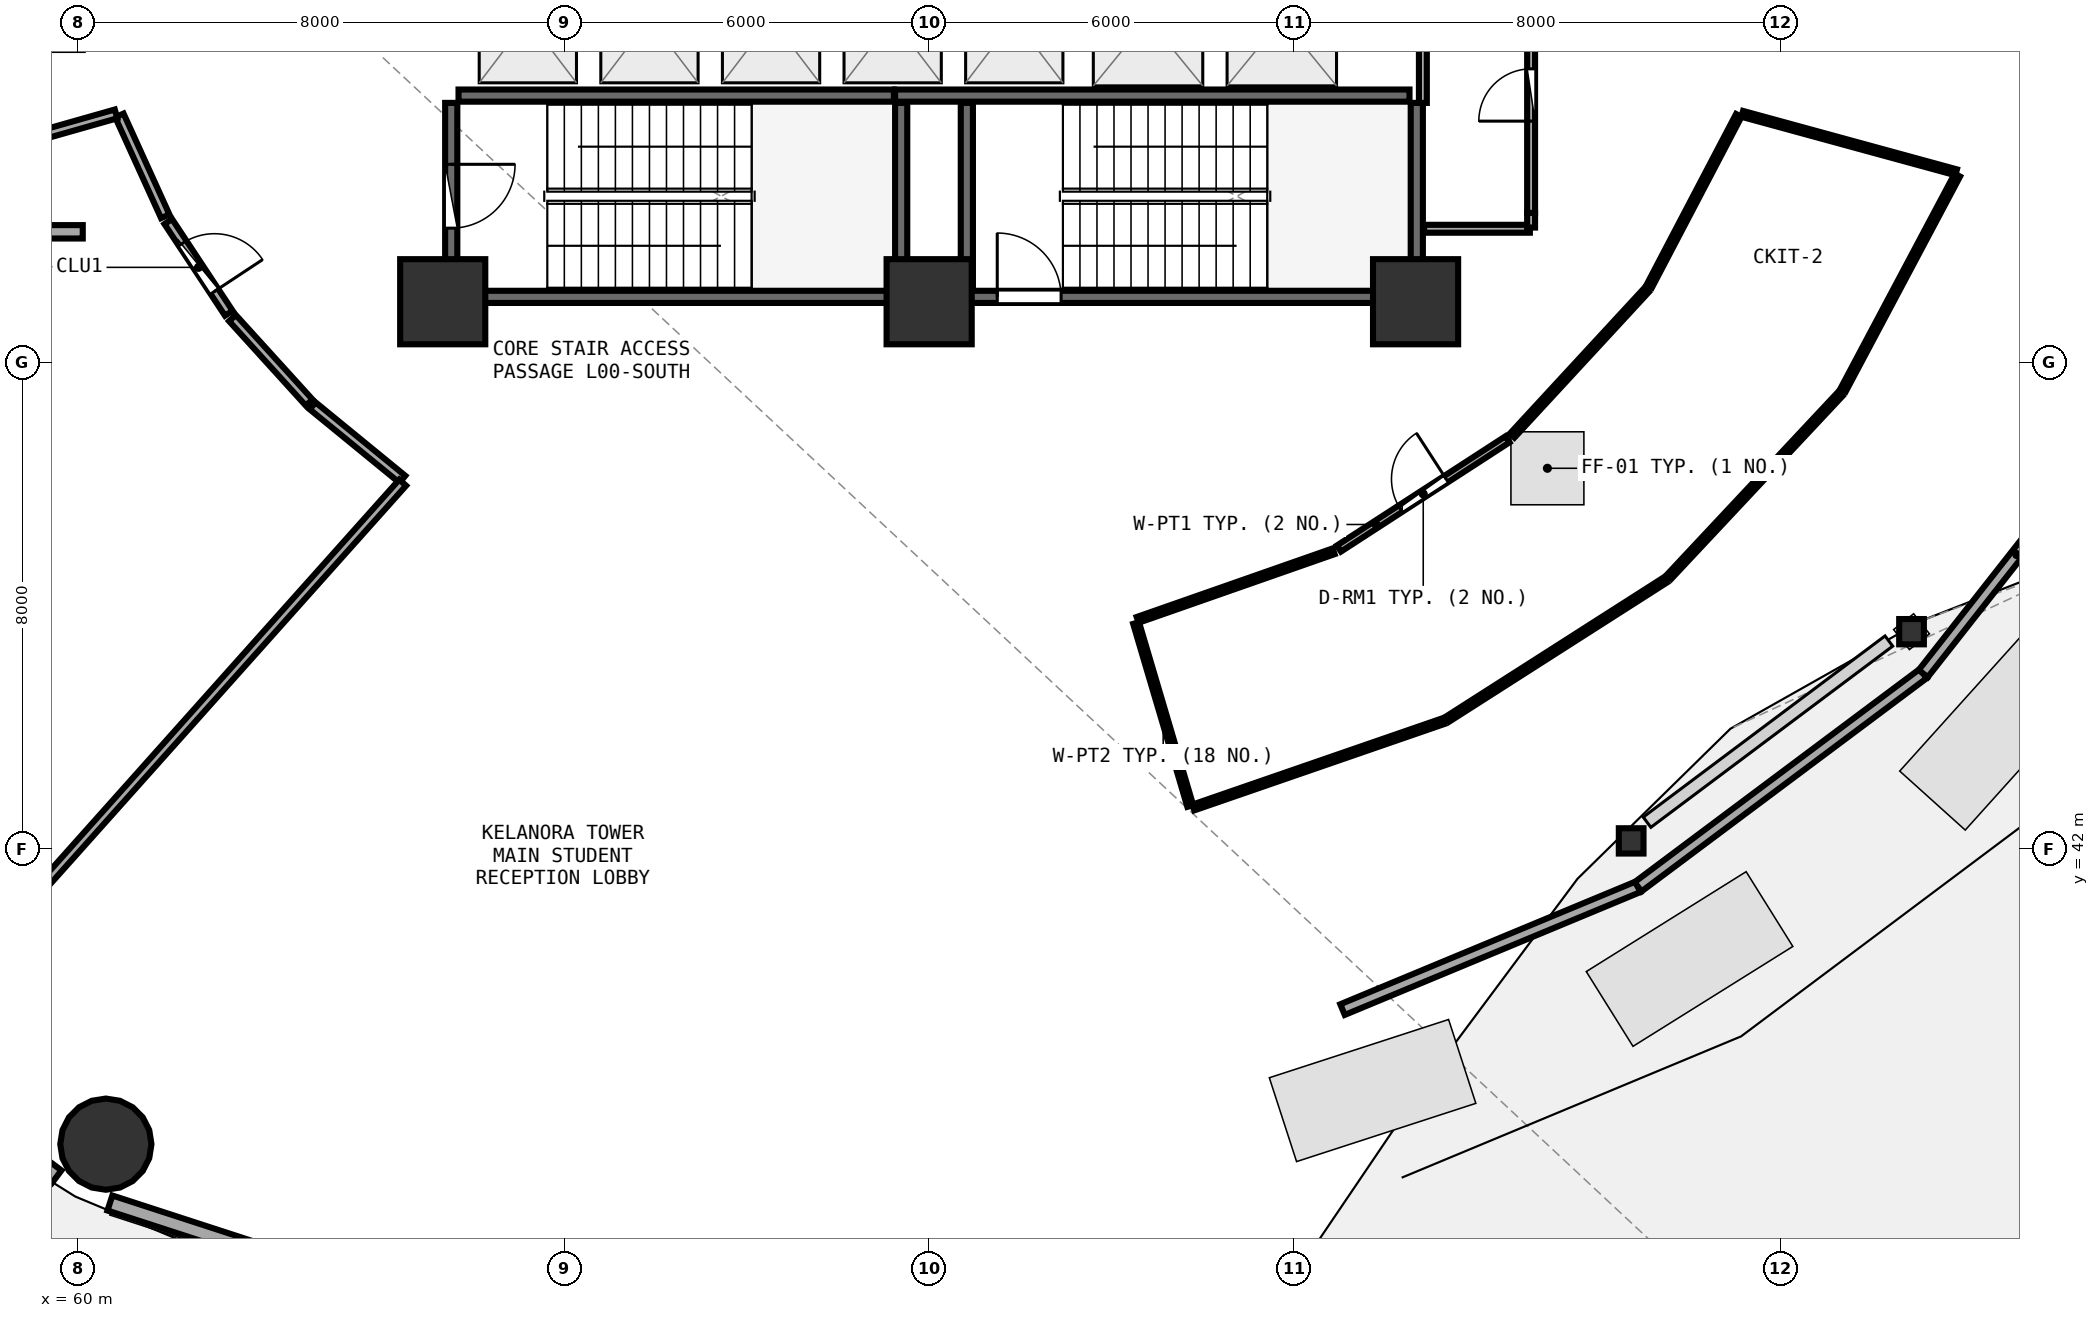
"""IFC4 building model, lengths in metres.
Left out: names, types, materials, properties, quantities, classifications, styles, units other than length and angle.
Written with IfcOpenShell. Run it as: python <this file> out.ifc"""

import sys

from ifc_helpers import new_model, si_unit, direction, frame, frame_2d, origin, origin_2d, place, context, subcontext, project, spatial, rectangle, circle, i_section, extrude, element, fill, save


model = new_model("IFC4")
c1 = context("Model", 3, precision=1e-05, world=origin(), true_north=direction((0.0, 1.0)))
c2 = subcontext(c1, "Body", "Model", "MODEL_VIEW")
j1 = project(units=[si_unit("LENGTHUNIT", "METRE"), si_unit("PLANEANGLEUNIT", "RADIAN")], contexts=[c1])
p1 = place(None, origin())
s1 = spatial("IfcSite", under=j1, at=p1, CompositionType="ELEMENT")
p2 = place(p1, origin())
s2 = spatial("IfcBuilding", under=s1, at=p2, CompositionType="ELEMENT")
p3 = place(p2, origin())
s3 = spatial("IfcBuildingStorey", under=s2, at=p3, CompositionType="ELEMENT", Elevation=0.0)
for number, where, z_axis, x_axis in (
    (1, (66.0, 51.0, 0.0), (0.0, 0.0, 1.0), (1.0, 0.0, 0.0)),
    (2, (74.0, 51.0, 0.0), (0.0, 0.0, 1.0), (1.0, 0.0, 0.0)),
    (3, (82.0, 51.0, 0.0), (0.0, 0.0, 1.0), (1.0, 0.0, 0.0)),
):
    element("IfcColumn", number, at=place(p3, frame(where, z_axis=z_axis, x_axis=x_axis)), inside=s3, PredefinedType="PILASTER", context=c2, shape_type="SweptSolid", body=[
        extrude(rectangle(XDim=1.4, YDim=1.4, at=origin_2d()), origin(), (0.0, 0.0, 1.0), 4.5),
    ])
p4 = place(p3, frame((60.46, 37.146, 0.0), z_axis=(0.0, 0.0, 1.0), x_axis=(1.0, 0.0, 0.0)))
e4 = element("IfcColumn", 4, at=p4, inside=s3, PredefinedType="COLUMN", context=c2, shape_type="SweptSolid", body=[
    extrude(circle(Radius=0.75, at=origin_2d()), origin(), (0.0, 0.0, 1.0), 4.5),
])
for number, where, z_axis, x_axis in (
    (5, (85.546, 42.134, 0.0), (0.0, 0.0, 1.0), (1.0, 0.0, 0.0)),
    (6, (90.156, 45.574, 0.0), (0.0, 0.0, 1.0), (1.0, 0.0, 0.0)),
):
    element("IfcColumn", number, at=place(p3, frame(where, z_axis=z_axis, x_axis=x_axis)), inside=s3, PredefinedType="COLUMN", context=c2, shape_type="SweptSolid", body=[
        extrude(i_section(OverallWidth=0.406, OverallDepth=0.416, WebThickness=0.029, FlangeThickness=0.048, FilletRadius=0.015, at=origin_2d()), origin(), (0.0, 0.0, 1.0), 4.5),
    ])
p5 = place(p3, frame((53.016, 41.582, 0.0), z_axis=(0.0, 0.0, 1.0), x_axis=(0.80030733173, -0.599590005569, 0.0)))
e7 = element("IfcWall", 7, at=p5, inside=s3, PredefinedType="SOLIDWALL", context=c2, shape_type="SweptSolid", body=[
    extrude(rectangle(XDim=8.291, YDim=0.26, at=frame_2d((4.145, 0.0))), origin(), (0.0, 0.0, 1.0), 4.185),
])
p6 = place(p5, frame((2.945, 0.0, 0.0)))
e8 = element("IfcOpeningElement", 8, at=p6, cuts=e7, PredefinedType="OPENING", context=c2, shape_type="SweptSolid", body=[
    extrude(rectangle(XDim=2.4, YDim=2.35, at=frame_2d((1.2, 1.175))), frame((0.0, 0.14, 0.0), z_axis=(0.0, -1.0, 0.0), x_axis=(1.0, 0.0, 0.0)), (0.0, 0.0, 1.0), 0.28),
])
p7 = place(p3, frame((60.526, 36.178, 0.0), z_axis=(0.0, 0.0, 1.0), x_axis=(0.951039914291, -0.309068085421, 0.0)))
e9 = element("IfcWall", 9, at=p7, inside=s3, PredefinedType="SOLIDWALL", context=c2, shape_type="SweptSolid", body=[
    extrude(rectangle(XDim=8.594, YDim=0.26, at=frame_2d((4.297, 0.0))), origin(), (0.0, 0.0, 1.0), 4.185),
])
p8 = place(p7, frame((3.097, 0.0, 0.0)))
e10 = element("IfcOpeningElement", 10, at=p8, cuts=e9, PredefinedType="OPENING", context=c2, shape_type="SweptSolid", body=[
    extrude(rectangle(XDim=2.4, YDim=2.35, at=frame_2d((1.2, 1.175))), frame((0.0, 0.14, 0.0), z_axis=(0.0, -1.0, 0.0), x_axis=(1.0, 0.0, 0.0)), (0.0, 0.0, 1.0), 0.28),
])
p9 = place(p3, frame((80.798, 39.359, 0.0), z_axis=(0.0, 0.0, 1.0), x_axis=(0.923474464617, 0.383659892614, 0.0)))
e11 = element("IfcWall", 11, at=p9, inside=s3, PredefinedType="PARAPET", context=c2, shape_type="SweptSolid", body=[
    extrude(rectangle(XDim=5.263, YDim=0.19, at=frame_2d((2.631, 0.0))), origin(), (0.0, 0.0, 1.0), 0.62),
])
p10 = place(p3, frame((85.658, 41.378, 0.0), z_axis=(0.0, 0.0, 1.0), x_axis=(0.800949430728, 0.59873200133, 0.0)))
e12 = element("IfcWall", 12, at=p10, inside=s3, PredefinedType="PARAPET", context=c2, shape_type="SweptSolid", body=[
    extrude(rectangle(XDim=5.857, YDim=0.19, at=frame_2d((2.928, 0.0))), origin(), (0.0, 0.0, 1.0), 0.62),
])
p11 = place(p3, frame((90.349, 44.885, 0.0), z_axis=(0.0, 0.0, 1.0), x_axis=(0.617936357215, 0.786228121115, 0.0)))
e13 = element("IfcWall", 13, at=p11, inside=s3, PredefinedType="PARAPET", context=c2, shape_type="SweptSolid", body=[
    extrude(rectangle(XDim=4.977, YDim=0.19, at=frame_2d((2.489, 0.0))), origin(), (0.0, 0.0, 1.0), 0.62),
])
p12 = place(p3, frame((74.0, 51.08, 0.0), z_axis=(0.0, 0.0, 1.0), x_axis=(1.0, 0.0, 0.0)))
e14 = element("IfcWall", 14, at=p12, inside=s3, PredefinedType="SHEAR", context=c2, shape_type="SweptSolid", body=[
    extrude(rectangle(XDim=7.9, YDim=0.2, at=frame_2d((3.95, 0.0))), origin(), (0.0, 0.0, 1.0), 4.2),
])
p13 = place(p12, frame((1.12, 0.0, 0.0)))
e15 = element("IfcOpeningElement", 15, at=p13, cuts=e14, PredefinedType="OPENING", context=c2, shape_type="SweptSolid", body=[
    extrude(rectangle(XDim=1.05, YDim=2.1, at=frame_2d((0.525, 1.05))), frame((0.0, 0.11, 0.0), z_axis=(0.0, -1.0, 0.0), x_axis=(1.0, 0.0, 0.0)), (0.0, 0.0, 1.0), 0.22),
])
p14 = place(p3, frame((82.02, 51.2, 0.0), z_axis=(0.0, 0.0, 1.0), x_axis=(0.0, 1.0, 0.0)))
e16 = element("IfcWall", 16, at=p14, inside=s3, PredefinedType="SHEAR", context=c2, shape_type="SweptSolid", body=[
    extrude(rectangle(XDim=3.07, YDim=0.2, at=frame_2d((1.535, 0.0))), origin(), (0.0, 0.0, 1.0), 4.2),
])
p15 = place(p3, frame((81.9, 54.39, 0.0), z_axis=(0.0, 0.0, 1.0), x_axis=(-1.0, 0.0, 0.0)))
e17 = element("IfcWall", 17, at=p15, inside=s3, PredefinedType="SHEAR", context=c2, shape_type="SweptSolid", body=[
    extrude(rectangle(XDim=8.46, YDim=0.2, at=frame_2d((4.23, 0.0))), origin(), (0.0, 0.0, 1.0), 4.2),
])
p16 = place(p3, frame((74.62, 54.27, 0.0), z_axis=(0.0, 0.0, 1.0), x_axis=(0.0, -1.0, 0.0)))
e18 = element("IfcWall", 18, at=p16, inside=s3, PredefinedType="SHEAR", context=c2, shape_type="SweptSolid", body=[
    extrude(rectangle(XDim=3.07, YDim=0.2, at=frame_2d((1.535, 0.0))), origin(), (0.0, 0.0, 1.0), 4.2),
])
p17 = place(p3, frame((66.26, 51.08, 0.0), z_axis=(0.0, 0.0, 1.0), x_axis=(1.0, 0.0, 0.0)))
e19 = element("IfcWall", 19, at=p17, inside=s3, PredefinedType="SHEAR", context=c2, shape_type="SweptSolid", body=[
    extrude(rectangle(XDim=7.16, YDim=0.2, at=frame_2d((3.58, 0.0))), origin(), (0.0, 0.0, 1.0), 4.2),
])
p18 = place(p3, frame((73.54, 51.2, 0.0), z_axis=(0.0, 0.0, 1.0), x_axis=(0.0, 1.0, 0.0)))
e20 = element("IfcWall", 20, at=p18, inside=s3, PredefinedType="SHEAR", context=c2, shape_type="SweptSolid", body=[
    extrude(rectangle(XDim=3.07, YDim=0.2, at=frame_2d((1.535, 0.0))), origin(), (0.0, 0.0, 1.0), 4.2),
])
p19 = place(p3, frame((73.42, 54.39, 0.0), z_axis=(0.0, 0.0, 1.0), x_axis=(-1.0, 0.0, 0.0)))
e21 = element("IfcWall", 21, at=p19, inside=s3, PredefinedType="SHEAR", context=c2, shape_type="SweptSolid", body=[
    extrude(rectangle(XDim=7.16, YDim=0.2, at=frame_2d((3.58, 0.0))), origin(), (0.0, 0.0, 1.0), 4.2),
])
p20 = place(p3, frame((66.14, 54.27, 0.0), z_axis=(0.0, 0.0, 1.0), x_axis=(0.0, -1.0, 0.0)))
e22 = element("IfcWall", 22, at=p20, inside=s3, PredefinedType="SHEAR", context=c2, shape_type="SweptSolid", body=[
    extrude(rectangle(XDim=3.07, YDim=0.2, at=frame_2d((1.535, 0.0))), origin(), (0.0, 0.0, 1.0), 4.2),
])
p21 = place(p20, frame((1.01, 0.0, 0.0)))
e23 = element("IfcOpeningElement", 23, at=p21, cuts=e22, PredefinedType="OPENING", context=c2, shape_type="SweptSolid", body=[
    extrude(rectangle(XDim=1.05, YDim=2.1, at=frame_2d((0.525, 1.05))), frame((0.0, 0.11, 0.0), z_axis=(0.0, -1.0, 0.0), x_axis=(1.0, 0.0, 0.0)), (0.0, 0.0, 1.0), 0.22),
])
p22 = place(p3, frame((47.32, 52.15, 0.0), z_axis=(0.0, 0.0, 1.0), x_axis=(1.0, 0.0, 0.0)))
e24 = element("IfcWall", 24, at=p22, inside=s3, PredefinedType="SOLIDWALL", context=c2, shape_type="SweptSolid", body=[
    extrude(rectangle(XDim=12.76, YDim=0.22, at=frame_2d((6.38, 0.0))), origin(), (0.0, 0.0, 1.0), 3.585),
])
p23 = place(p3, frame((83.9, 52.46, 0.0), z_axis=(0.0, 0.0, 1.0), x_axis=(0.0, 1.0, 0.0)))
e25 = element("IfcWall", 25, at=p23, inside=s3, PredefinedType="PLUMBINGWALL", context=c2, shape_type="SweptSolid", body=[
    extrude(rectangle(XDim=3.88, YDim=0.13, at=frame_2d((1.94, 0.0))), origin(), (0.0, 0.0, 1.0), 4.19),
])
p24 = place(p23, frame((1.51, 0.0, 0.0)))
e26 = element("IfcOpeningElement", 26, at=p24, cuts=e25, PredefinedType="OPENING", context=c2, shape_type="SweptSolid", body=[
    extrude(rectangle(XDim=0.86, YDim=2.05, at=frame_2d((0.43, 1.025))), frame((0.0, 0.075, 0.0), z_axis=(0.0, -1.0, 0.0), x_axis=(1.0, 0.0, 0.0)), (0.0, 0.0, 1.0), 0.15),
])
p25 = place(p3, frame((61.486, 52.319, 0.0), z_axis=(0.0, 0.0, 1.0), x_axis=(0.551109461678, -0.834432957912, 0.0)))
e27 = element("IfcWall", 27, at=p25, inside=s3, PredefinedType="PARTITIONING", context=c2, shape_type="SweptSolid", body=[
    extrude(rectangle(XDim=1.807, YDim=0.15, at=frame_2d((0.903, 0.0))), origin(), (0.0, 0.0, 1.0), 3.585),
])
p26 = place(p25, frame((0.428, 0.0, 0.0)))
e28 = element("IfcOpeningElement", 28, at=p26, cuts=e27, PredefinedType="OPENING", context=c2, shape_type="SweptSolid", body=[
    extrude(rectangle(XDim=0.95, YDim=2.08, at=frame_2d((0.475, 1.04))), frame((0.0, 0.085, 0.0), z_axis=(0.0, -1.0, 0.0), x_axis=(1.0, 0.0, 0.0)), (0.0, 0.0, 1.0), 0.17),
])
p27 = place(p3, frame((80.74, 46.942, 0.0), z_axis=(0.0, 0.0, 1.0), x_axis=(0.839224842152, 0.543784575282, 0.0)))
e29 = element("IfcWall", 29, at=p27, inside=s3, PredefinedType="PARTITIONING", context=c2, shape_type="SweptSolid", body=[
    extrude(rectangle(XDim=3.302, YDim=0.12, at=frame_2d((1.651, 0.0))), origin(), (0.0, 0.0, 1.0), 3.585),
])
p28 = place(p27, frame((1.201, 0.0, 0.0)))
e30 = element("IfcOpeningElement", 30, at=p28, cuts=e29, PredefinedType="OPENING", context=c2, shape_type="SweptSolid", body=[
    extrude(rectangle(XDim=0.9, YDim=2.08, at=frame_2d((0.45, 1.04))), frame((0.0, 0.07, 0.0), z_axis=(0.0, -1.0, 0.0), x_axis=(1.0, 0.0, 0.0)), (0.0, 0.0, 1.0), 0.14),
])
p29 = place(p3, frame((82.14, 52.2, 0.0), z_axis=(0.0, 0.0, 1.0), x_axis=(1.0, 0.0, 0.0)))
e31 = element("IfcWall", 31, at=p29, inside=s3, PredefinedType="PLUMBINGWALL", context=c2, shape_type="SweptSolid", body=[
    extrude(rectangle(XDim=1.74, YDim=0.13, at=frame_2d((0.87, 0.0))), origin(), (0.0, 0.0, 1.0), 3.485),
])
p30 = place(p3, frame((83.9, 52.22, 0.0), z_axis=(0.0, 0.0, 1.0), x_axis=(0.0, 1.0, 0.0)))
e32 = element("IfcWall", 32, at=p30, inside=s3, PredefinedType="PLUMBINGWALL", context=c2, shape_type="SweptSolid", body=[
    extrude(rectangle(XDim=0.24, YDim=0.13, at=frame_2d((0.12, 0.0))), origin(), (0.0, 0.0, 1.0), 4.19),
])
p31 = place(p3, frame((82.12, 56.58, 0.0), z_axis=(0.0, 0.0, 1.0), x_axis=(0.0, -1.0, 0.0)))
e33 = element("IfcWall", 33, at=p31, inside=s3, PredefinedType="PLUMBINGWALL", context=c2, shape_type="SweptSolid", body=[
    extrude(rectangle(XDim=2.31, YDim=0.13, at=frame_2d((1.155, 0.0))), origin(), (0.0, 0.0, 1.0), 3.485),
])
p32 = place(p3, frame((60.683, 54.064, 0.0), z_axis=(0.0, 0.0, 1.0), x_axis=(0.413772648006, -0.910380247897, 0.0)))
e34 = element("IfcWall", 34, at=p32, inside=s3, PredefinedType="PARTITIONING", context=c2, shape_type="SweptSolid", body=[
    extrude(rectangle(XDim=1.822, YDim=0.15, at=frame_2d((0.911, 0.0))), origin(), (0.0, 0.0, 1.0), 4.19),
])
p33 = place(p3, frame((62.542, 50.731, 0.0), z_axis=(0.0, 0.0, 1.0), x_axis=(0.672186822345, -0.740381574505, 0.0)))
e35 = element("IfcWall", 35, at=p33, inside=s3, PredefinedType="PARTITIONING", context=c2, shape_type="SweptSolid", body=[
    extrude(rectangle(XDim=1.876, YDim=0.15, at=frame_2d((0.938, 0.0))), origin(), (0.0, 0.0, 1.0), 3.585),
])
p34 = place(p3, frame((63.861, 49.288, 0.0), z_axis=(0.0, 0.0, 1.0), x_axis=(0.774014344512, -0.633168061805, 0.0)))
e36 = element("IfcWall", 36, at=p34, inside=s3, PredefinedType="PARTITIONING", context=c2, shape_type="SweptSolid", body=[
    extrude(rectangle(XDim=1.907, YDim=0.15, at=frame_2d((0.953, 0.0))), origin(), (0.0, 0.0, 1.0), 3.585),
])
p35 = place(p3, frame((65.341, 48.025, 0.0), z_axis=(0.0, 0.0, 1.0), x_axis=(-0.666165058958, -0.745804340443, 0.0)))
e37 = element("IfcWall", 37, at=p35, inside=s3, PredefinedType="PARTITIONING", context=c2, shape_type="SweptSolid", body=[
    extrude(rectangle(XDim=8.774, YDim=0.15, at=frame_2d((4.387, 0.0))), origin(), (0.0, 0.0, 1.0), 3.585),
])
p36 = place(p3, frame((54.789, 52.43, 0.0), z_axis=(0.0, 0.0, 1.0), x_axis=(0.961911562736, 0.273360833836, 0.0)))
e38 = element("IfcWall", 38, at=p36, inside=s3, PredefinedType="PARTITIONING", context=c2, shape_type="SweptSolid", body=[
    extrude(rectangle(XDim=6.07, YDim=0.15, at=frame_2d((3.035, 0.0))), origin(), (0.0, 0.0, 1.0), 3.885),
])
p37 = place(p3, frame((77.43, 45.768, 0.0), z_axis=(0.0, 0.0, 1.0), x_axis=(0.943895142086, 0.330245303898, 0.0)))
e39 = element("IfcWall", 39, at=p37, inside=s3, PredefinedType="PARTITIONING", context=c2, shape_type="SweptSolid", body=[
    extrude(rectangle(XDim=3.414, YDim=0.1, at=frame_2d((1.707, 0.0))), origin(), (0.0, 0.0, 1.0), 4.19),
])
p38 = place(p3, frame((83.589, 48.799, 0.0), z_axis=(0.0, 0.0, 1.0), x_axis=(0.678488862619, 0.734610688257, 0.0)))
e40 = element("IfcWall", 40, at=p38, inside=s3, PredefinedType="PARTITIONING", context=c2, shape_type="SweptSolid", body=[
    extrude(rectangle(XDim=3.254, YDim=0.1, at=frame_2d((1.627, 0.0))), origin(), (0.0, 0.0, 1.0), 3.585),
])
p39 = place(p3, frame((85.843, 51.254, 0.0), z_axis=(0.0, 0.0, 1.0), x_axis=(0.464213996316, 0.885723075021, 0.0)))
e41 = element("IfcWall", 41, at=p39, inside=s3, PredefinedType="PARTITIONING", context=c2, shape_type="SweptSolid", body=[
    extrude(rectangle(XDim=3.173, YDim=0.1, at=frame_2d((1.586, 0.0))), origin(), (0.0, 0.0, 1.0), 4.19),
])
p40 = place(p3, frame((87.373, 54.09, 0.0), z_axis=(0.0, 0.0, 1.0), x_axis=(0.964640120238, -0.263570556831, 0.0)))
e42 = element("IfcWall", 42, at=p40, inside=s3, PredefinedType="PARTITIONING", context=c2, shape_type="SweptSolid", body=[
    extrude(rectangle(XDim=3.647, YDim=0.1, at=frame_2d((1.823, 0.0))), origin(), (0.0, 0.0, 1.0), 3.945),
])
p41 = place(p3, frame((90.91, 53.083, 0.0), z_axis=(0.0, 0.0, 1.0), x_axis=(-0.469290424741, -0.883043881835, 0.0)))
e43 = element("IfcWall", 43, at=p41, inside=s3, PredefinedType="PARTITIONING", context=c2, shape_type="SweptSolid", body=[
    extrude(rectangle(XDim=4.005, YDim=0.1, at=frame_2d((2.002, 0.0))), origin(), (0.0, 0.0, 1.0), 3.585),
])
p42 = place(p3, frame((88.985, 49.482, 0.0), z_axis=(0.0, 0.0, 1.0), x_axis=(-0.683655334271, -0.729805031446, 0.0)))
e44 = element("IfcWall", 44, at=p42, inside=s3, PredefinedType="PARTITIONING", context=c2, shape_type="SweptSolid", body=[
    extrude(rectangle(XDim=4.121, YDim=0.1, at=frame_2d((2.061, 0.0))), origin(), (0.0, 0.0, 1.0), 3.585),
])
p43 = place(p3, frame((86.106, 46.424, 0.0), z_axis=(0.0, 0.0, 1.0), x_axis=(-0.842680324252, -0.538414218905, 0.0)))
e45 = element("IfcWall", 45, at=p43, inside=s3, PredefinedType="PARTITIONING", context=c2, shape_type="SweptSolid", body=[
    extrude(rectangle(XDim=4.248, YDim=0.1, at=frame_2d((2.124, 0.0))), origin(), (0.0, 0.0, 1.0), 3.585),
])
p44 = place(p3, frame((82.455, 44.102, 0.0), z_axis=(0.0, 0.0, 1.0), x_axis=(-0.945232717828, -0.326397164737, 0.0)))
e46 = element("IfcWall", 46, at=p44, inside=s3, PredefinedType="PARTITIONING", context=c2, shape_type="SweptSolid", body=[
    extrude(rectangle(XDim=4.35, YDim=0.1, at=frame_2d((2.175, 0.0))), origin(), (0.0, 0.0, 1.0), 3.585),
])
p45 = place(p3, frame((78.295, 42.708, 0.0), z_axis=(0.0, 0.0, 1.0), x_axis=(-0.284027408145, 0.958816161432, 0.0)))
e47 = element("IfcWall", 47, at=p45, inside=s3, PredefinedType="PARTITIONING", context=c2, shape_type="SweptSolid", body=[
    extrude(rectangle(XDim=3.138, YDim=0.1, at=frame_2d((1.569, 0.0))), origin(), (0.0, 0.0, 1.0), 3.945),
])
p46 = place(p13, origin())
e48 = element("IfcDoor", 48, at=p46, inside=s3, OperationType="SINGLE_SWING_LEFT", PredefinedType="DOOR", context=c2, shape_type="SweptSolid", body=[
    extrude(rectangle(XDim=1.05, YDim=2.1, at=frame_2d((0.525, 1.05))), frame((0.0, 0.025, 0.0), z_axis=(0.0, -1.0, 0.0), x_axis=(1.0, 0.0, 0.0)), (0.0, 0.0, 1.0), 0.05),
])
fill(e15, e48)
p47 = place(p21, origin())
e49 = element("IfcDoor", 49, at=p47, inside=s3, OperationType="SINGLE_SWING_LEFT", PredefinedType="DOOR", context=c2, shape_type="SweptSolid", body=[
    extrude(rectangle(XDim=1.05, YDim=2.1, at=frame_2d((0.525, 1.05))), frame((0.0, 0.025, 0.0), z_axis=(0.0, -1.0, 0.0), x_axis=(1.0, 0.0, 0.0)), (0.0, 0.0, 1.0), 0.05),
])
fill(e23, e49)
p48 = place(p24, origin())
e50 = element("IfcDoor", 50, at=p48, inside=s3, OperationType="SINGLE_SWING_LEFT", PredefinedType="DOOR", context=c2, shape_type="SweptSolid", body=[
    extrude(rectangle(XDim=0.86, YDim=2.05, at=frame_2d((0.43, 1.025))), frame((0.0, 0.025, 0.0), z_axis=(0.0, -1.0, 0.0), x_axis=(1.0, 0.0, 0.0)), (0.0, 0.0, 1.0), 0.05),
])
fill(e26, e50)
p49 = place(p26, origin())
e51 = element("IfcDoor", 51, at=p49, inside=s3, OperationType="SINGLE_SWING_RIGHT", PredefinedType="DOOR", context=c2, shape_type="SweptSolid", body=[
    extrude(rectangle(XDim=0.95, YDim=2.08, at=frame_2d((0.475, 1.04))), frame((0.0, 0.025, 0.0), z_axis=(0.0, -1.0, 0.0), x_axis=(1.0, 0.0, 0.0)), (0.0, 0.0, 1.0), 0.05),
])
fill(e28, e51)
p50 = place(p28, origin())
e52 = element("IfcDoor", 52, at=p50, inside=s3, OperationType="SINGLE_SWING_RIGHT", PredefinedType="DOOR", context=c2, shape_type="SweptSolid", body=[
    extrude(rectangle(XDim=0.9, YDim=2.08, at=frame_2d((0.45, 1.04))), frame((0.0, 0.025, 0.0), z_axis=(0.0, -1.0, 0.0), x_axis=(1.0, 0.0, 0.0)), (0.0, 0.0, 1.0), 0.05),
])
fill(e30, e52)
save(model, sys.argv[1])
